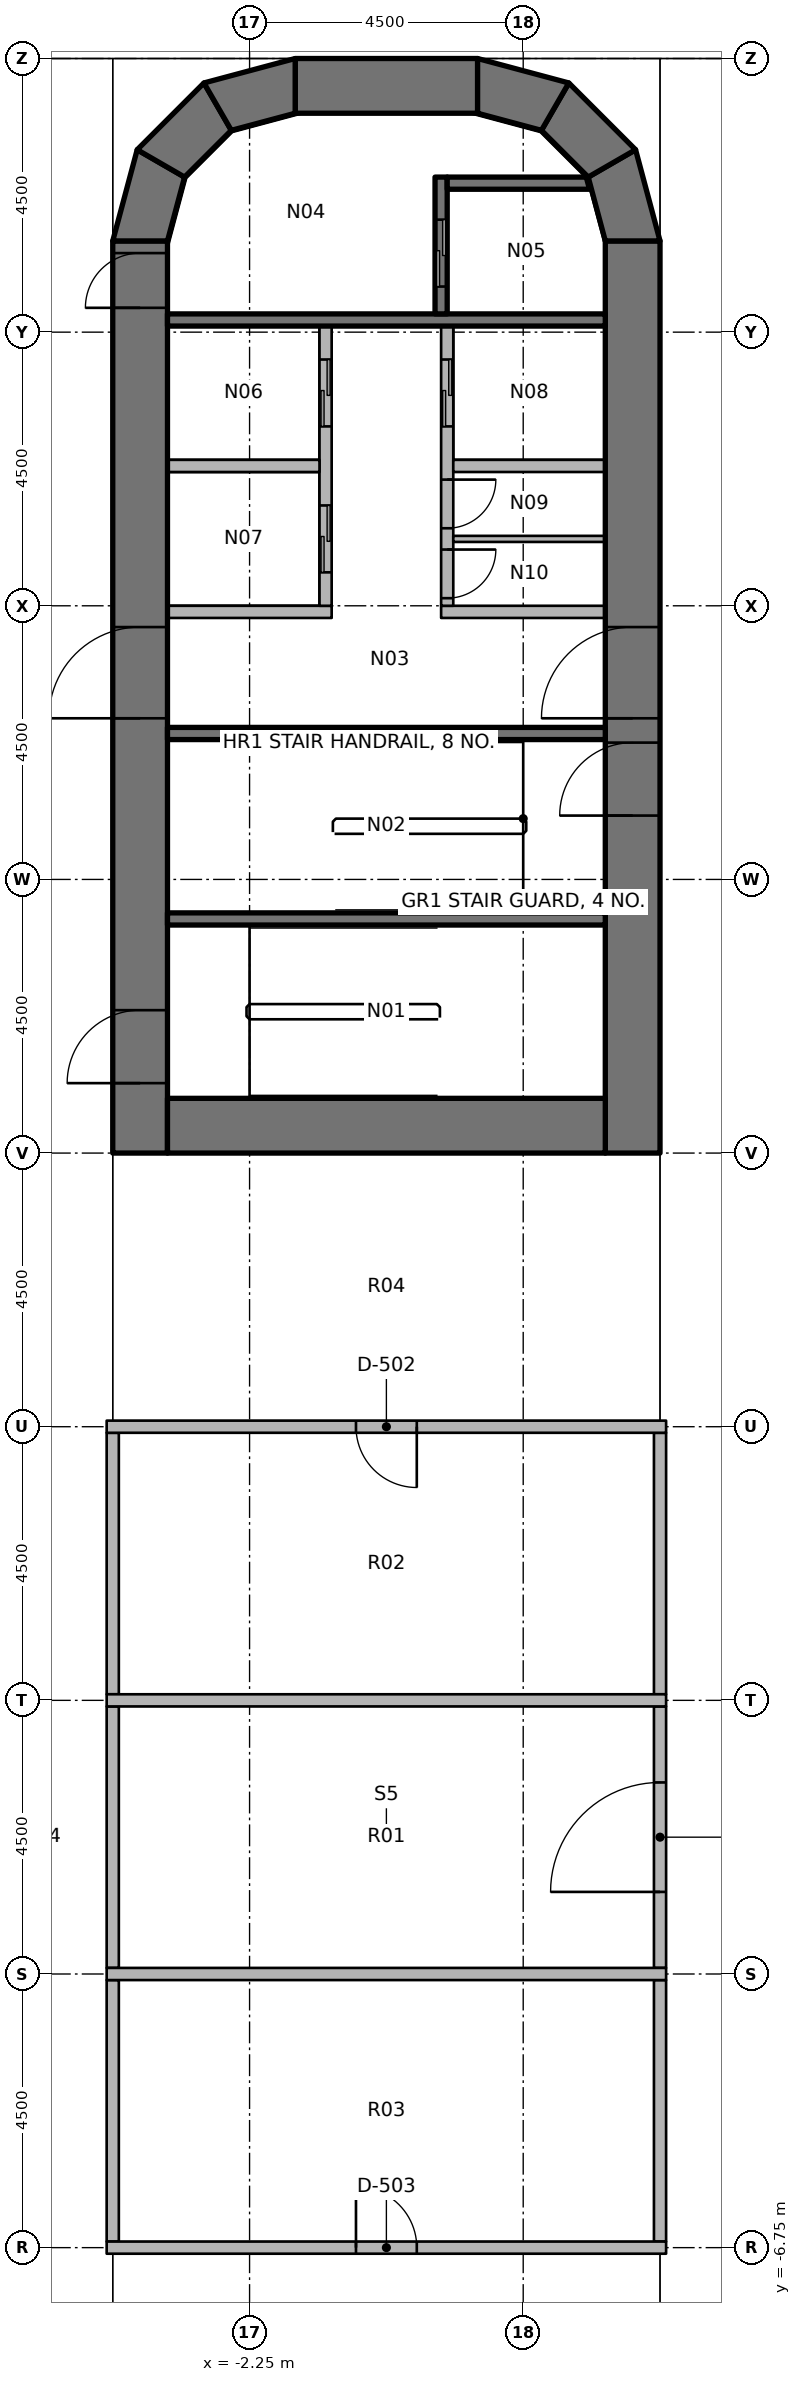
"""IFC4 building model, lengths in metres.
Left out: names, types, materials, properties, quantities, classifications, styles, units other than length and angle.
Written with IfcOpenShell. Run it as: python <this file> out.ifc"""

import sys

from ifc_helpers import new_model, si_unit, direction, frame, frame_2d, origin, place, context, subcontext, project, spatial, polyline, rectangle, outline, extrude, element, fill, save


model = new_model("IFC4")
c1 = context("Model", 3, precision=1e-05, world=origin(), true_north=direction((0.0, 1.0)))
c2 = subcontext(c1, "Body", "Model", "MODEL_VIEW")
j1 = project(units=[si_unit("LENGTHUNIT", "METRE"), si_unit("PLANEANGLEUNIT", "RADIAN")], contexts=[c1])
p1 = place(None, origin())
s1 = spatial("IfcSite", under=j1, at=p1, CompositionType="ELEMENT")
p2 = place(p1, origin())
s2 = spatial("IfcBuilding", under=s1, at=p2, CompositionType="ELEMENT")
p3 = place(p2, frame((0.0, 0.0, 69.0)))
s3 = spatial("IfcBuildingStorey", under=s2, at=p3, CompositionType="ELEMENT", Elevation=69.0)
p4 = place(p3, frame((-4.05, 11.25, 0.0), z_axis=(0.0, 0.0, 1.0), x_axis=(0.0, 1.0, 0.0)))
e1 = element("IfcWall", 1, at=p4, inside=s3, PredefinedType="SHEAR", context=c2, shape_type="SweptSolid", body=[
    extrude(rectangle(XDim=15.0, YDim=0.9, at=frame_2d((7.5, 0.0))), origin(), (0.0, 0.0, 1.0), 4.2),
])
p5 = place(p4, frame((7.15, 0.0, 0.0)))
e2 = element("IfcOpeningElement", 2, at=p5, cuts=e1, PredefinedType="OPENING", context=c2, shape_type="SweptSolid", body=[
    extrude(rectangle(XDim=1.5, YDim=2.3, at=frame_2d((0.75, 1.15))), frame((0.0, 0.46, 0.0), z_axis=(0.0, -1.0, 0.0), x_axis=(1.0, 0.0, 0.0)), (0.0, 0.0, 1.0), 0.92),
])
p6 = place(p4, frame((13.9, 0.0, 0.0)))
e3 = element("IfcOpeningElement", 3, at=p6, cuts=e1, PredefinedType="OPENING", context=c2, shape_type="SweptSolid", body=[
    extrude(rectangle(XDim=0.9, YDim=2.1, at=frame_2d((0.45, 1.05))), frame((0.0, 0.46, 0.0), z_axis=(0.0, -1.0, 0.0), x_axis=(1.0, 0.0, 0.0)), (0.0, 0.0, 1.0), 0.92),
])
p7 = place(p4, frame((1.15, 0.0, 0.0)))
e4 = element("IfcOpeningElement", 4, at=p7, cuts=e1, PredefinedType="OPENING", context=c2, shape_type="SweptSolid", body=[
    extrude(rectangle(XDim=1.2, YDim=2.1, at=frame_2d((0.6, 1.05))), frame((0.0, 0.46, 0.0), z_axis=(0.0, -1.0, 0.0), x_axis=(1.0, 0.0, 0.0)), (0.0, 0.0, 1.0), 0.92),
])
p8 = place(p3, frame((4.05, 11.25, 0.0), z_axis=(0.0, 0.0, 1.0), x_axis=(0.0, 1.0, 0.0)))
e5 = element("IfcWall", 5, at=p8, inside=s3, PredefinedType="SHEAR", context=c2, shape_type="SweptSolid", body=[
    extrude(rectangle(XDim=15.0, YDim=0.9, at=frame_2d((7.5, 0.0))), origin(), (0.0, 0.0, 1.0), 4.2),
])
p9 = place(p8, frame((7.15, 0.0, 0.0)))
e6 = element("IfcOpeningElement", 6, at=p9, cuts=e5, PredefinedType="OPENING", context=c2, shape_type="SweptSolid", body=[
    extrude(rectangle(XDim=1.5, YDim=2.3, at=frame_2d((0.75, 1.15))), frame((0.0, 0.46, 0.0), z_axis=(0.0, -1.0, 0.0), x_axis=(1.0, 0.0, 0.0)), (0.0, 0.0, 1.0), 0.92),
])
p10 = place(p8, frame((5.55, 0.0, 0.0)))
e7 = element("IfcOpeningElement", 7, at=p10, cuts=e5, PredefinedType="OPENING", context=c2, shape_type="SweptSolid", body=[
    extrude(rectangle(XDim=1.2, YDim=2.1, at=frame_2d((0.6, 1.05))), frame((0.0, 0.46, 0.0), z_axis=(0.0, -1.0, 0.0), x_axis=(1.0, 0.0, 0.0)), (0.0, 0.0, 1.0), 0.92),
])
p11 = place(p3, frame((-3.6, 11.7, 0.0), z_axis=(0.0, 0.0, 1.0), x_axis=(1.0, 0.0, 0.0)))
e8 = element("IfcWall", 8, at=p11, inside=s3, PredefinedType="SHEAR", context=c2, shape_type="SweptSolid", body=[
    extrude(rectangle(XDim=7.2, YDim=0.9, at=frame_2d((3.6, 0.0))), origin(), (0.0, 0.0, 1.0), 4.2),
])
p12 = place(p3, frame((-1.5, 28.8, 0.0), z_axis=(0.0, 0.0, 1.0), x_axis=(1.0, 0.0, 0.0)))
e9 = element("IfcWall", 9, at=p12, inside=s3, PredefinedType="SHEAR", context=c2, shape_type="SweptSolid", body=[
    extrude(rectangle(XDim=3.0, YDim=0.9, at=frame_2d((1.5, 0.0))), origin(), (0.0, 0.0, 1.0), 4.2),
])
p13 = place(p3, origin())
e10 = element("IfcWall", 10, at=p13, inside=s3, PredefinedType="SHEAR", context=c2, shape_type="SweptSolid", body=[
    extrude(outline(polyline([(-4.5, 26.25), (-4.098, 27.75), (-3.319, 27.3), (-3.6, 26.25), (-4.5, 26.25)])), origin(), (0.0, 0.0, 1.0), 4.2),
])
p14 = place(p3, origin())
e11 = element("IfcWall", 11, at=p14, inside=s3, PredefinedType="SHEAR", context=c2, shape_type="SweptSolid", body=[
    extrude(outline(polyline([(-4.098, 27.75), (-3.0, 28.848), (-2.55, 28.069), (-3.319, 27.3), (-4.098, 27.75)])), origin(), (0.0, 0.0, 1.0), 4.2),
])
p15 = place(p3, origin())
e12 = element("IfcWall", 12, at=p15, inside=s3, PredefinedType="SHEAR", context=c2, shape_type="SweptSolid", body=[
    extrude(outline(polyline([(-3.0, 28.848), (-1.5, 29.25), (-1.5, 28.35), (-2.55, 28.069), (-3.0, 28.848)])), origin(), (0.0, 0.0, 1.0), 4.2),
])
p16 = place(p3, origin())
e13 = element("IfcWall", 13, at=p16, inside=s3, PredefinedType="SHEAR", context=c2, shape_type="SweptSolid", body=[
    extrude(outline(polyline([(4.5, 26.25), (4.098, 27.75), (3.319, 27.3), (3.6, 26.25), (4.5, 26.25)])), origin(), (0.0, 0.0, 1.0), 4.2),
])
p17 = place(p3, origin())
e14 = element("IfcWall", 14, at=p17, inside=s3, PredefinedType="SHEAR", context=c2, shape_type="SweptSolid", body=[
    extrude(outline(polyline([(4.098, 27.75), (3.0, 28.848), (2.55, 28.069), (3.319, 27.3), (4.098, 27.75)])), origin(), (0.0, 0.0, 1.0), 4.2),
])
p18 = place(p3, origin())
e15 = element("IfcWall", 15, at=p18, inside=s3, PredefinedType="SHEAR", context=c2, shape_type="SweptSolid", body=[
    extrude(outline(polyline([(3.0, 28.848), (1.5, 29.25), (1.5, 28.35), (2.55, 28.069), (3.0, 28.848)])), origin(), (0.0, 0.0, 1.0), 4.2),
])
p19 = place(p3, frame((-3.6, 24.95, 0.0), z_axis=(0.0, 0.0, 1.0), x_axis=(1.0, 0.0, 0.0)))
e16 = element("IfcWall", 16, at=p19, inside=s3, PredefinedType="SHEAR", context=c2, shape_type="SweptSolid", body=[
    extrude(rectangle(XDim=7.2, YDim=0.2, at=frame_2d((3.6, 0.0))), origin(), (0.0, 0.0, 1.0), 4.05),
])
p20 = place(p3, frame((0.9, 27.3, 0.0), z_axis=(0.0, 0.0, 1.0), x_axis=(0.0, -1.0, 0.0)))
e17 = element("IfcWall", 17, at=p20, inside=s3, PredefinedType="SHEAR", context=c2, shape_type="SweptSolid", body=[
    extrude(rectangle(XDim=2.25, YDim=0.2, at=frame_2d((1.125, 0.0))), origin(), (0.0, 0.0, 1.0), 4.05),
])
p21 = place(p20, frame((0.7, 0.0, 0.0)))
e18 = element("IfcOpeningElement", 18, at=p21, cuts=e17, PredefinedType="OPENING", context=c2, shape_type="SweptSolid", body=[
    extrude(rectangle(XDim=1.1, YDim=2.3, at=frame_2d((0.55, 1.15))), frame((0.0, 0.11, 0.0), z_axis=(0.0, -1.0, 0.0), x_axis=(1.0, 0.0, 0.0)), (0.0, 0.0, 1.0), 0.22),
])
p22 = place(p3, origin())
e19 = element("IfcWall", 19, at=p22, inside=s3, PredefinedType="SHEAR", context=c2, shape_type="SweptSolid", body=[
    extrude(outline(polyline([(1.0, 27.1), (3.341, 27.1), (3.291, 27.284), (3.275, 27.3), (1.0, 27.3), (1.0, 27.1)])), origin(), (0.0, 0.0, 1.0), 4.05),
])
for number, where, z_axis, x_axis in (
    (20, (-3.6, 18.15, 0.0), (0.0, 0.0, 1.0), (1.0, 0.0, 0.0)),
    (21, (-3.6, 15.1, 0.0), (0.0, 0.0, 1.0), (1.0, 0.0, 0.0)),
):
    element("IfcWall", number, at=place(p3, frame(where, z_axis=z_axis, x_axis=x_axis)), inside=s3, PredefinedType="SHEAR", context=c2, shape_type="SweptSolid", body=[
        extrude(rectangle(XDim=7.2, YDim=0.2, at=frame_2d((3.6, 0.0))), origin(), (0.0, 0.0, 1.0), 4.05),
    ])
p23 = place(p3, frame((-3.6, 20.15, 0.0), z_axis=(0.0, 0.0, 1.0), x_axis=(1.0, 0.0, 0.0)))
e22 = element("IfcWall", 22, at=p23, inside=s3, PredefinedType="PARTITIONING", context=c2, shape_type="SweptSolid", body=[
    extrude(rectangle(XDim=2.7, YDim=0.2, at=frame_2d((1.35, 0.0))), origin(), (0.0, 0.0, 1.0), 4.05),
])
p24 = place(p3, frame((-1.0, 24.85, 0.0), z_axis=(0.0, 0.0, 1.0), x_axis=(0.0, -1.0, 0.0)))
e23 = element("IfcWall", 23, at=p24, inside=s3, PredefinedType="PARTITIONING", context=c2, shape_type="SweptSolid", body=[
    extrude(rectangle(XDim=4.6, YDim=0.2, at=frame_2d((2.3, 0.0))), origin(), (0.0, 0.0, 1.0), 4.05),
])
p25 = place(p24, frame((0.55, 0.0, 0.0)))
e24 = element("IfcOpeningElement", 24, at=p25, cuts=e23, PredefinedType="OPENING", context=c2, shape_type="SweptSolid", body=[
    extrude(rectangle(XDim=1.1, YDim=2.3, at=frame_2d((0.55, 1.15))), frame((0.0, 0.11, 0.0), z_axis=(0.0, -1.0, 0.0), x_axis=(1.0, 0.0, 0.0)), (0.0, 0.0, 1.0), 0.22),
])
p26 = place(p24, frame((2.95, 0.0, 0.0)))
e25 = element("IfcOpeningElement", 25, at=p26, cuts=e23, PredefinedType="OPENING", context=c2, shape_type="SweptSolid", body=[
    extrude(rectangle(XDim=1.1, YDim=2.3, at=frame_2d((0.55, 1.15))), frame((0.0, 0.11, 0.0), z_axis=(0.0, -1.0, 0.0), x_axis=(1.0, 0.0, 0.0)), (0.0, 0.0, 1.0), 0.22),
])
p27 = place(p3, frame((0.9, 20.15, 0.0), z_axis=(0.0, 0.0, 1.0), x_axis=(1.0, 0.0, 0.0)))
e26 = element("IfcWall", 26, at=p27, inside=s3, PredefinedType="PARTITIONING", context=c2, shape_type="SweptSolid", body=[
    extrude(rectangle(XDim=2.7, YDim=0.2, at=frame_2d((1.35, 0.0))), origin(), (0.0, 0.0, 1.0), 4.05),
])
p28 = place(p3, frame((1.0, 24.85, 0.0), z_axis=(0.0, 0.0, 1.0), x_axis=(0.0, -1.0, 0.0)))
e27 = element("IfcWall", 27, at=p28, inside=s3, PredefinedType="PARTITIONING", context=c2, shape_type="SweptSolid", body=[
    extrude(rectangle(XDim=4.6, YDim=0.2, at=frame_2d((2.3, 0.0))), origin(), (0.0, 0.0, 1.0), 4.05),
])
p29 = place(p28, frame((0.55, 0.0, 0.0)))
e28 = element("IfcOpeningElement", 28, at=p29, cuts=e27, PredefinedType="OPENING", context=c2, shape_type="SweptSolid", body=[
    extrude(rectangle(XDim=1.1, YDim=2.3, at=frame_2d((0.55, 1.15))), frame((0.0, 0.11, 0.0), z_axis=(0.0, -1.0, 0.0), x_axis=(1.0, 0.0, 0.0)), (0.0, 0.0, 1.0), 0.22),
])
p30 = place(p28, frame((2.525, 0.0, 0.0)))
e29 = element("IfcOpeningElement", 29, at=p30, cuts=e27, PredefinedType="OPENING", context=c2, shape_type="SweptSolid", body=[
    extrude(rectangle(XDim=0.8, YDim=2.1, at=frame_2d((0.4, 1.05))), frame((0.0, 0.11, 0.0), z_axis=(0.0, -1.0, 0.0), x_axis=(1.0, 0.0, 0.0)), (0.0, 0.0, 1.0), 0.22),
])
p31 = place(p28, frame((3.675, 0.0, 0.0)))
e30 = element("IfcOpeningElement", 30, at=p31, cuts=e27, PredefinedType="OPENING", context=c2, shape_type="SweptSolid", body=[
    extrude(rectangle(XDim=0.8, YDim=2.1, at=frame_2d((0.4, 1.05))), frame((0.0, 0.11, 0.0), z_axis=(0.0, -1.0, 0.0), x_axis=(1.0, 0.0, 0.0)), (0.0, 0.0, 1.0), 0.22),
])
for number, where, z_axis, x_axis in (
    (31, (-3.6, 22.55, 0.0), (0.0, 0.0, 1.0), (1.0, 0.0, 0.0)),
    (32, (1.1, 22.55, 0.0), (0.0, 0.0, 1.0), (1.0, 0.0, 0.0)),
):
    element("IfcWall", number, at=place(p3, frame(where, z_axis=z_axis, x_axis=x_axis)), inside=s3, PredefinedType="PARTITIONING", context=c2, shape_type="SweptSolid", body=[
        extrude(rectangle(XDim=2.5, YDim=0.2, at=frame_2d((1.25, 0.0))), origin(), (0.0, 0.0, 1.0), 4.05),
    ])
p32 = place(p3, frame((1.1, 21.35, 0.0), z_axis=(0.0, 0.0, 1.0), x_axis=(1.0, 0.0, 0.0)))
e33 = element("IfcWall", 33, at=p32, inside=s3, PredefinedType="PARTITIONING", context=c2, shape_type="SweptSolid", body=[
    extrude(rectangle(XDim=2.5, YDim=0.1, at=frame_2d((1.25, 0.0))), origin(), (0.0, 0.0, 1.0), 4.05),
])
for number, where, z_axis, x_axis in (
    (34, (-4.5, 2.35, 0.0), (0.0, 0.0, 1.0), (0.0, 1.0, 0.0)),
    (35, (-4.5, -2.15, 0.0), (0.0, 0.0, 1.0), (0.0, 1.0, 0.0)),
    (36, (-4.5, -6.65, 0.0), (0.0, 0.0, 1.0), (0.0, 1.0, 0.0)),
    (37, (4.5, 2.35, 0.0), (0.0, 0.0, 1.0), (0.0, 1.0, 0.0)),
):
    element("IfcWall", number, at=place(p3, frame(where, z_axis=z_axis, x_axis=x_axis)), inside=s3, PredefinedType="PARTITIONING", context=c2, shape_type="SweptSolid", body=[
        extrude(rectangle(XDim=4.3, YDim=0.2, at=frame_2d((2.15, 0.0))), origin(), (0.0, 0.0, 1.0), 3.131),
    ])
p33 = place(p3, frame((4.5, -2.15, 0.0), z_axis=(0.0, 0.0, 1.0), x_axis=(0.0, 1.0, 0.0)))
e38 = element("IfcWall", 38, at=p33, inside=s3, PredefinedType="PARTITIONING", context=c2, shape_type="SweptSolid", body=[
    extrude(rectangle(XDim=4.3, YDim=0.2, at=frame_2d((2.15, 0.0))), origin(), (0.0, 0.0, 1.0), 3.131),
])
p34 = place(p33, frame((1.25, 0.0, 0.0)))
e39 = element("IfcOpeningElement", 39, at=p34, cuts=e38, PredefinedType="OPENING", context=c2, shape_type="SweptSolid", body=[
    extrude(rectangle(XDim=1.8, YDim=2.1, at=frame_2d((0.9, 1.05))), frame((0.0, 0.11, 0.0), z_axis=(0.0, -1.0, 0.0), x_axis=(1.0, 0.0, 0.0)), (0.0, 0.0, 1.0), 0.22),
])
p35 = place(p3, frame((4.5, -6.65, 0.0), z_axis=(0.0, 0.0, 1.0), x_axis=(0.0, 1.0, 0.0)))
e40 = element("IfcWall", 40, at=p35, inside=s3, PredefinedType="PARTITIONING", context=c2, shape_type="SweptSolid", body=[
    extrude(rectangle(XDim=4.3, YDim=0.2, at=frame_2d((2.15, 0.0))), origin(), (0.0, 0.0, 1.0), 3.131),
])
p36 = place(p3, frame((4.6, 6.75, 0.0), z_axis=(0.0, 0.0, 1.0), x_axis=(-1.0, 0.0, 0.0)))
e41 = element("IfcWall", 41, at=p36, inside=s3, PredefinedType="PARTITIONING", context=c2, shape_type="SweptSolid", body=[
    extrude(rectangle(XDim=9.2, YDim=0.2, at=frame_2d((4.6, 0.0))), origin(), (0.0, 0.0, 1.0), 3.131),
])
p37 = place(p36, frame((4.1, 0.0, 0.0)))
e42 = element("IfcOpeningElement", 42, at=p37, cuts=e41, PredefinedType="OPENING", context=c2, shape_type="SweptSolid", body=[
    extrude(rectangle(XDim=1.0, YDim=2.1, at=frame_2d((0.5, 1.05))), frame((0.0, 0.11, 0.0), z_axis=(0.0, -1.0, 0.0), x_axis=(1.0, 0.0, 0.0)), (0.0, 0.0, 1.0), 0.22),
])
p38 = place(p3, frame((-4.6, -6.75, 0.0), z_axis=(0.0, 0.0, 1.0), x_axis=(1.0, 0.0, 0.0)))
e43 = element("IfcWall", 43, at=p38, inside=s3, PredefinedType="PARTITIONING", context=c2, shape_type="SweptSolid", body=[
    extrude(rectangle(XDim=9.2, YDim=0.2, at=frame_2d((4.6, 0.0))), origin(), (0.0, 0.0, 1.0), 3.131),
])
p39 = place(p38, frame((4.1, 0.0, 0.0)))
e44 = element("IfcOpeningElement", 44, at=p39, cuts=e43, PredefinedType="OPENING", context=c2, shape_type="SweptSolid", body=[
    extrude(rectangle(XDim=1.0, YDim=2.1, at=frame_2d((0.5, 1.05))), frame((0.0, 0.11, 0.0), z_axis=(0.0, -1.0, 0.0), x_axis=(1.0, 0.0, 0.0)), (0.0, 0.0, 1.0), 0.22),
])
for number, where, z_axis, x_axis in (
    (45, (-4.6, 2.25, 0.0), (0.0, 0.0, 1.0), (1.0, 0.0, 0.0)),
    (46, (-4.6, -2.25, 0.0), (0.0, 0.0, 1.0), (1.0, 0.0, 0.0)),
):
    element("IfcWall", number, at=place(p3, frame(where, z_axis=z_axis, x_axis=x_axis)), inside=s3, PredefinedType="PARTITIONING", context=c2, shape_type="SweptSolid", body=[
        extrude(rectangle(XDim=9.2, YDim=0.2, at=frame_2d((4.6, 0.0))), origin(), (0.0, 0.0, 1.0), 3.131),
    ])
p40 = place(p5, origin())
e47 = element("IfcDoor", 47, at=p40, inside=s3, OperationType="DOUBLE_DOOR_SINGLE_SWING", PredefinedType="DOOR", context=c2, shape_type="SweptSolid", body=[
    extrude(rectangle(XDim=1.5, YDim=2.3, at=frame_2d((0.75, 1.15))), frame((0.0, 0.025, 0.0), z_axis=(0.0, -1.0, 0.0), x_axis=(1.0, 0.0, 0.0)), (0.0, 0.0, 1.0), 0.05),
])
fill(e2, e47)
p41 = place(p9, origin())
e48 = element("IfcDoor", 48, at=p41, inside=s3, OperationType="DOUBLE_DOOR_SINGLE_SWING", PredefinedType="DOOR", context=c2, shape_type="SweptSolid", body=[
    extrude(rectangle(XDim=1.5, YDim=2.3, at=frame_2d((0.75, 1.15))), frame((0.0, 0.025, 0.0), z_axis=(0.0, -1.0, 0.0), x_axis=(1.0, 0.0, 0.0)), (0.0, 0.0, 1.0), 0.05),
])
fill(e6, e48)
p42 = place(p6, origin())
e49 = element("IfcDoor", 49, at=p42, inside=s3, OperationType="SINGLE_SWING_RIGHT", PredefinedType="DOOR", context=c2, shape_type="SweptSolid", body=[
    extrude(rectangle(XDim=0.9, YDim=2.1, at=frame_2d((0.45, 1.05))), frame((0.0, 0.025, 0.0), z_axis=(0.0, -1.0, 0.0), x_axis=(1.0, 0.0, 0.0)), (0.0, 0.0, 1.0), 0.05),
])
fill(e3, e49)
p43 = place(p10, origin())
e50 = element("IfcDoor", 50, at=p43, inside=s3, OperationType="SINGLE_SWING_LEFT", PredefinedType="DOOR", context=c2, shape_type="SweptSolid", body=[
    extrude(rectangle(XDim=1.2, YDim=2.1, at=frame_2d((0.6, 1.05))), frame((0.0, 0.025, 0.0), z_axis=(0.0, -1.0, 0.0), x_axis=(1.0, 0.0, 0.0)), (0.0, 0.0, 1.0), 0.05),
])
fill(e7, e50)
p44 = place(p7, origin())
e51 = element("IfcDoor", 51, at=p44, inside=s3, OperationType="SINGLE_SWING_LEFT", PredefinedType="DOOR", context=c2, shape_type="SweptSolid", body=[
    extrude(rectangle(XDim=1.2, YDim=2.1, at=frame_2d((0.6, 1.05))), frame((0.0, 0.025, 0.0), z_axis=(0.0, -1.0, 0.0), x_axis=(1.0, 0.0, 0.0)), (0.0, 0.0, 1.0), 0.05),
])
fill(e4, e51)
p45 = place(p21, origin())
e52 = element("IfcDoor", 52, at=p45, inside=s3, OperationType="DOUBLE_DOOR_SLIDING", PredefinedType="DOOR", context=c2, shape_type="SweptSolid", body=[
    extrude(rectangle(XDim=1.1, YDim=2.3, at=frame_2d((0.55, 1.15))), frame((0.0, 0.025, 0.0), z_axis=(0.0, -1.0, 0.0), x_axis=(1.0, 0.0, 0.0)), (0.0, 0.0, 1.0), 0.05),
])
fill(e18, e52)
p46 = place(p25, origin())
e53 = element("IfcDoor", 53, at=p46, inside=s3, OperationType="DOUBLE_DOOR_SLIDING", PredefinedType="DOOR", context=c2, shape_type="SweptSolid", body=[
    extrude(rectangle(XDim=1.1, YDim=2.3, at=frame_2d((0.55, 1.15))), frame((0.0, 0.025, 0.0), z_axis=(0.0, -1.0, 0.0), x_axis=(1.0, 0.0, 0.0)), (0.0, 0.0, 1.0), 0.05),
])
fill(e24, e53)
p47 = place(p26, origin())
e54 = element("IfcDoor", 54, at=p47, inside=s3, OperationType="DOUBLE_DOOR_SLIDING", PredefinedType="DOOR", context=c2, shape_type="SweptSolid", body=[
    extrude(rectangle(XDim=1.1, YDim=2.3, at=frame_2d((0.55, 1.15))), frame((0.0, 0.025, 0.0), z_axis=(0.0, -1.0, 0.0), x_axis=(1.0, 0.0, 0.0)), (0.0, 0.0, 1.0), 0.05),
])
fill(e25, e54)
p48 = place(p29, origin())
e55 = element("IfcDoor", 55, at=p48, inside=s3, OperationType="DOUBLE_DOOR_SLIDING", PredefinedType="DOOR", context=c2, shape_type="SweptSolid", body=[
    extrude(rectangle(XDim=1.1, YDim=2.3, at=frame_2d((0.55, 1.15))), frame((0.0, 0.025, 0.0), z_axis=(0.0, -1.0, 0.0), x_axis=(1.0, 0.0, 0.0)), (0.0, 0.0, 1.0), 0.05),
])
fill(e28, e55)
p49 = place(p30, origin())
e56 = element("IfcDoor", 56, at=p49, inside=s3, OperationType="SINGLE_SWING_RIGHT", PredefinedType="DOOR", context=c2, shape_type="SweptSolid", body=[
    extrude(rectangle(XDim=0.8, YDim=2.1, at=frame_2d((0.4, 1.05))), frame((0.0, 0.025, 0.0), z_axis=(0.0, -1.0, 0.0), x_axis=(1.0, 0.0, 0.0)), (0.0, 0.0, 1.0), 0.05),
])
fill(e29, e56)
p50 = place(p31, origin())
e57 = element("IfcDoor", 57, at=p50, inside=s3, OperationType="SINGLE_SWING_RIGHT", PredefinedType="DOOR", context=c2, shape_type="SweptSolid", body=[
    extrude(rectangle(XDim=0.8, YDim=2.1, at=frame_2d((0.4, 1.05))), frame((0.0, 0.025, 0.0), z_axis=(0.0, -1.0, 0.0), x_axis=(1.0, 0.0, 0.0)), (0.0, 0.0, 1.0), 0.05),
])
fill(e30, e57)
p51 = place(p34, origin())
e58 = element("IfcDoor", 58, at=p51, inside=s3, OperationType="DOUBLE_DOOR_SINGLE_SWING", PredefinedType="DOOR", context=c2, shape_type="SweptSolid", body=[
    extrude(rectangle(XDim=1.8, YDim=2.1, at=frame_2d((0.9, 1.05))), frame((0.0, 0.025, 0.0), z_axis=(0.0, -1.0, 0.0), x_axis=(1.0, 0.0, 0.0)), (0.0, 0.0, 1.0), 0.05),
])
fill(e39, e58)
p52 = place(p37, origin())
e59 = element("IfcDoor", 59, at=p52, inside=s3, OperationType="SINGLE_SWING_RIGHT", PredefinedType="DOOR", context=c2, shape_type="SweptSolid", body=[
    extrude(rectangle(XDim=1.0, YDim=2.1, at=frame_2d((0.5, 1.05))), frame((0.0, 0.025, 0.0), z_axis=(0.0, -1.0, 0.0), x_axis=(1.0, 0.0, 0.0)), (0.0, 0.0, 1.0), 0.05),
])
fill(e42, e59)
p53 = place(p39, origin())
e60 = element("IfcDoor", 60, at=p53, inside=s3, OperationType="SINGLE_SWING_RIGHT", PredefinedType="DOOR", context=c2, shape_type="SweptSolid", body=[
    extrude(rectangle(XDim=1.0, YDim=2.1, at=frame_2d((0.5, 1.05))), frame((0.0, 0.025, 0.0), z_axis=(0.0, -1.0, 0.0), x_axis=(1.0, 0.0, 0.0)), (0.0, 0.0, 1.0), 0.05),
])
fill(e44, e60)
save(model, sys.argv[1])
